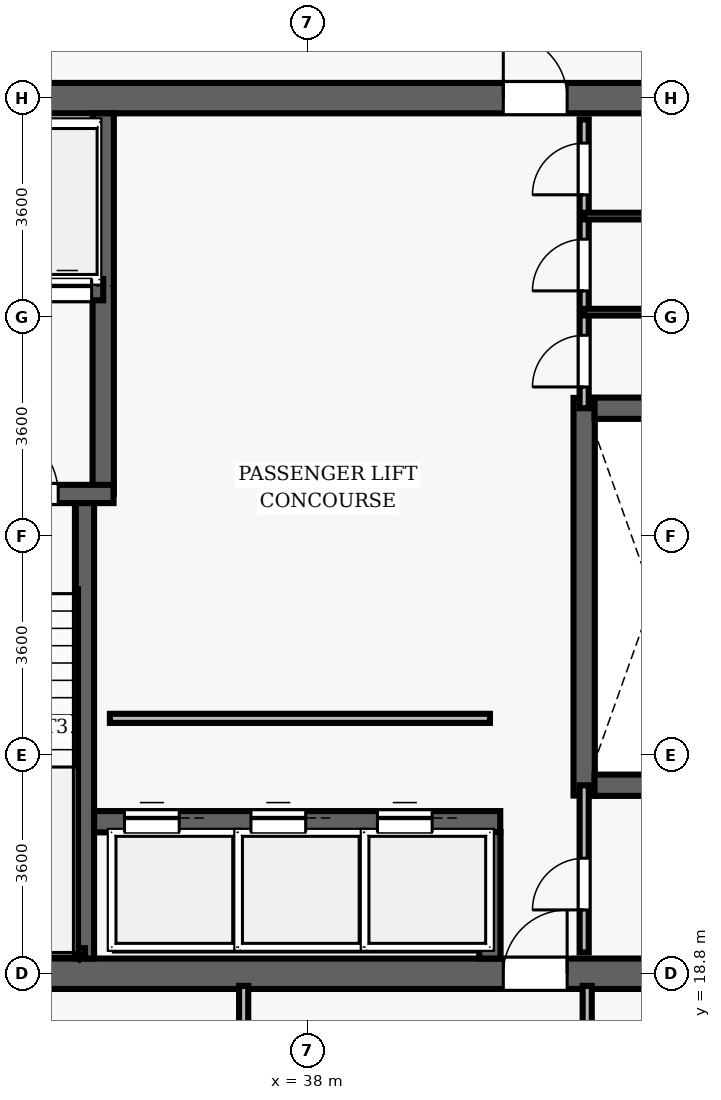
"""IFC4 building model, lengths in metres.
Left out: names, types, materials, properties, quantities, classifications, styles, units other than length and angle.
Written with IfcOpenShell. Run it as: python <this file> out.ifc"""

import sys

from ifc_helpers import new_model, si_unit, direction, frame, frame_2d, origin, place, context, subcontext, project, spatial, rectangle, extrude, element, fill, save


model = new_model("IFC4")
c1 = context("Model", 3, precision=1e-05, world=origin(), true_north=direction((0.0, 1.0)))
c2 = subcontext(c1, "Body", "Model", "MODEL_VIEW")
j1 = project(units=[si_unit("LENGTHUNIT", "METRE"), si_unit("PLANEANGLEUNIT", "RADIAN")], contexts=[c1])
p1 = place(None, origin())
s1 = spatial("IfcSite", under=j1, at=p1, CompositionType="ELEMENT")
p2 = place(p1, origin())
s2 = spatial("IfcBuilding", under=s1, at=p2, CompositionType="ELEMENT")
p3 = place(p2, frame((0.0, 0.0, 205.85)))
s3 = spatial("IfcBuildingStorey", under=s2, at=p3, CompositionType="ELEMENT", Elevation=205.85)
p4 = place(p3, frame((26.75, 18.8, 0.0), z_axis=(0.0, 0.0, 1.0), x_axis=(1.0, 0.0, 0.0)))
e1 = element("IfcWall", 1, at=p4, inside=s3, PredefinedType="SHEAR", context=c2, shape_type="SweptSolid", body=[
    extrude(rectangle(XDim=22.5, YDim=0.5, at=frame_2d((11.25, 0.0))), origin(), (0.0, 0.0, 1.0), 3.85),
])
p5 = place(p4, frame((14.47, 0.0, 0.0)))
e2 = element("IfcOpeningElement", 2, at=p5, cuts=e1, PredefinedType="OPENING", context=c2, shape_type="SweptSolid", body=[
    extrude(rectangle(XDim=1.05, YDim=2.15, at=frame_2d((0.525, 1.075))), frame((0.0, 0.26, 0.0), z_axis=(0.0, -1.0, 0.0), x_axis=(1.0, 0.0, 0.0)), (0.0, 0.0, 1.0), 0.52),
])
p6 = place(p3, frame((26.75, 33.2, 0.0), z_axis=(0.0, 0.0, 1.0), x_axis=(1.0, 0.0, 0.0)))
e3 = element("IfcWall", 3, at=p6, inside=s3, PredefinedType="SHEAR", context=c2, shape_type="SweptSolid", body=[
    extrude(rectangle(XDim=22.5, YDim=0.5, at=frame_2d((11.25, 0.0))), origin(), (0.0, 0.0, 1.0), 3.85),
])
p7 = place(p6, frame((4.57, 0.0, 0.0)))
e4 = element("IfcOpeningElement", 4, at=p7, cuts=e3, PredefinedType="OPENING", context=c2, shape_type="SweptSolid", body=[
    extrude(rectangle(XDim=1.05, YDim=2.15, at=frame_2d((0.525, 1.075))), frame((0.0, 0.26, 0.0), z_axis=(0.0, -1.0, 0.0), x_axis=(1.0, 0.0, 0.0)), (0.0, 0.0, 1.0), 0.52),
])
p8 = place(p6, frame((14.47, 0.0, 0.0)))
e5 = element("IfcOpeningElement", 5, at=p8, cuts=e3, PredefinedType="OPENING", context=c2, shape_type="SweptSolid", body=[
    extrude(rectangle(XDim=1.05, YDim=2.15, at=frame_2d((0.525, 1.075))), frame((0.0, 0.26, 0.0), z_axis=(0.0, -1.0, 0.0), x_axis=(1.0, 0.0, 0.0)), (0.0, 0.0, 1.0), 0.52),
])
p9 = place(p3, frame((34.34, 19.05, 0.0), z_axis=(0.0, 0.0, 1.0), x_axis=(0.0, 1.0, 0.0)))
e6 = element("IfcWall", 6, at=p9, inside=s3, PredefinedType="SHEAR", context=c2, shape_type="SweptSolid", body=[
    extrude(rectangle(XDim=7.5, YDim=0.3, at=frame_2d((3.75, 0.0))), origin(), (0.0, 0.0, 1.0), 3.85),
])
p10 = place(p3, frame((34.64, 26.69, 0.0), z_axis=(0.0, 0.0, 1.0), x_axis=(0.0, 1.0, 0.0)))
e7 = element("IfcWall", 7, at=p10, inside=s3, PredefinedType="SHEAR", context=c2, shape_type="SweptSolid", body=[
    extrude(rectangle(XDim=6.26, YDim=0.35, at=frame_2d((3.13, 0.0))), origin(), (0.0, 0.0, 1.0), 3.85),
])
p11 = place(p3, frame((31.25, 26.69, 0.0), z_axis=(0.0, 0.0, 1.0), x_axis=(1.0, 0.0, 0.0)))
e8 = element("IfcWall", 8, at=p11, inside=s3, PredefinedType="SHEAR", context=c2, shape_type="SweptSolid", body=[
    extrude(rectangle(XDim=3.56, YDim=0.3, at=frame_2d((1.78, 0.0))), origin(), (0.0, 0.0, 1.0), 3.85),
])
p12 = place(p11, frame((1.55, 0.0, 0.0)))
e9 = element("IfcOpeningElement", 9, at=p12, cuts=e8, PredefinedType="OPENING", context=c2, shape_type="SweptSolid", body=[
    extrude(rectangle(XDim=1.1, YDim=2.15, at=frame_2d((0.55, 1.075))), frame((0.0, 0.16, 0.0), z_axis=(0.0, -1.0, 0.0), x_axis=(1.0, 0.0, 0.0)), (0.0, 0.0, 1.0), 0.32),
])
p13 = place(p3, frame((31.3, 19.16, 0.0), z_axis=(0.0, 0.0, 1.0), x_axis=(1.0, 0.0, 0.0)))
e10 = element("IfcWall", 10, at=p13, inside=s3, PredefinedType="SHEAR", context=c2, shape_type="SweptSolid", body=[
    extrude(rectangle(XDim=3.04, YDim=0.12, at=frame_2d((1.52, 0.0))), origin(), (0.0, 0.0, 1.0), 3.85),
])
p14 = place(p3, frame((32.23, 30.05, 0.0), z_axis=(0.0, 0.0, 1.0), x_axis=(1.0, 0.0, 0.0)))
e11 = element("IfcWall", 11, at=p14, inside=s3, PredefinedType="SHEAR", context=c2, shape_type="SweptSolid", body=[
    extrude(rectangle(XDim=2.41, YDim=0.35, at=frame_2d((1.205, 0.0))), origin(), (0.0, 0.0, 1.0), 3.035),
])
p15 = place(p14, frame((0.42, 0.0, 0.0)))
e12 = element("IfcOpeningElement", 12, at=p15, cuts=e11, PredefinedType="OPENING", context=c2, shape_type="SweptSolid", body=[
    extrude(rectangle(XDim=0.8, YDim=2.15, at=frame_2d((0.4, 1.075))), frame((0.0, 0.185, 0.0), z_axis=(0.0, -1.0, 0.0), x_axis=(1.0, 0.0, 0.0)), (0.0, 0.0, 1.0), 0.37),
])
p16 = place(p14, frame((1.42, 0.0, 0.0)))
e13 = element("IfcOpeningElement", 13, at=p16, cuts=e11, PredefinedType="OPENING", context=c2, shape_type="SweptSolid", body=[
    extrude(rectangle(XDim=0.8, YDim=2.15, at=frame_2d((0.4, 1.075))), frame((0.0, 0.185, 0.0), z_axis=(0.0, -1.0, 0.0), x_axis=(1.0, 0.0, 0.0)), (0.0, 0.0, 1.0), 0.37),
])
p17 = place(p3, frame((42.55, 21.73, 0.0), z_axis=(0.0, 0.0, 1.0), x_axis=(0.0, 1.0, 0.0)))
e14 = element("IfcWall", 14, at=p17, inside=s3, PredefinedType="SHEAR", context=c2, shape_type="SweptSolid", body=[
    extrude(rectangle(XDim=6.54, YDim=0.35, at=frame_2d((3.27, 0.0))), origin(), (0.0, 0.0, 1.0), 3.035),
])
for number, where, z_axis, x_axis in (
    (15, (42.72, 21.9, 0.0), (0.0, 0.0, 1.0), (1.0, 0.0, 0.0)),
    (16, (42.72, 28.1, 0.0), (0.0, 0.0, 1.0), (1.0, 0.0, 0.0)),
):
    element("IfcWall", number, at=place(p3, frame(where, z_axis=z_axis, x_axis=x_axis)), inside=s3, PredefinedType="SHEAR", context=c2, shape_type="SweptSolid", body=[
        extrude(rectangle(XDim=2.03, YDim=0.35, at=frame_2d((1.015, 0.0))), origin(), (0.0, 0.0, 1.0), 3.035),
    ])
p18 = place(p3, frame((34.49, 21.3, 0.0), z_axis=(0.0, 0.0, 1.0), x_axis=(1.0, 0.0, 0.0)))
e17 = element("IfcWall", 17, at=p18, inside=s3, PredefinedType="SHEAR", context=c2, shape_type="SweptSolid", body=[
    extrude(rectangle(XDim=6.68, YDim=0.35, at=frame_2d((3.34, 0.0))), origin(), (0.0, 0.0, 1.0), 3.035),
])
p19 = place(p18, frame((0.5, 0.0, 0.0)))
e18 = element("IfcOpeningElement", 18, at=p19, cuts=e17, PredefinedType="OPENING", context=c2, shape_type="SweptSolid", body=[
    extrude(rectangle(XDim=0.9, YDim=2.15, at=frame_2d((0.45, 1.075))), frame((0.0, 0.185, 0.0), z_axis=(0.0, -1.0, 0.0), x_axis=(1.0, 0.0, 0.0)), (0.0, 0.0, 1.0), 0.37),
])
p20 = place(p18, frame((2.58, 0.0, 0.0)))
e19 = element("IfcOpeningElement", 19, at=p20, cuts=e17, PredefinedType="OPENING", context=c2, shape_type="SweptSolid", body=[
    extrude(rectangle(XDim=0.9, YDim=2.15, at=frame_2d((0.45, 1.075))), frame((0.0, 0.185, 0.0), z_axis=(0.0, -1.0, 0.0), x_axis=(1.0, 0.0, 0.0)), (0.0, 0.0, 1.0), 0.37),
])
p21 = place(p18, frame((4.66, 0.0, 0.0)))
e20 = element("IfcOpeningElement", 20, at=p21, cuts=e17, PredefinedType="OPENING", context=c2, shape_type="SweptSolid", body=[
    extrude(rectangle(XDim=0.9, YDim=2.15, at=frame_2d((0.45, 1.075))), frame((0.0, 0.185, 0.0), z_axis=(0.0, -1.0, 0.0), x_axis=(1.0, 0.0, 0.0)), (0.0, 0.0, 1.0), 0.37),
])
p22 = place(p3, frame((41.0, 19.05, 0.0), z_axis=(0.0, 0.0, 1.0), x_axis=(0.0, 1.0, 0.0)))
e21 = element("IfcWall", 21, at=p22, inside=s3, PredefinedType="SHEAR", context=c2, shape_type="SweptSolid", body=[
    extrude(rectangle(XDim=2.08, YDim=0.35, at=frame_2d((1.04, 0.0))), origin(), (0.0, 0.0, 1.0), 3.035),
])
p23 = place(p3, frame((34.75, 23.0, 0.0), z_axis=(0.0, 0.0, 1.0), x_axis=(1.0, 0.0, 0.0)))
e22 = element("IfcWall", 22, at=p23, inside=s3, PredefinedType="PARTITIONING", context=c2, shape_type="SweptSolid", body=[
    extrude(rectangle(XDim=6.25, YDim=0.15, at=frame_2d((3.125, 0.0))), origin(), (0.0, 0.0, 1.0), 3.035),
])
p24 = place(p3, frame((42.55, 28.1, 0.0), z_axis=(0.0, 0.0, 1.0), x_axis=(0.0, 1.0, 0.0)))
e23 = element("IfcWall", 23, at=p24, inside=s3, PredefinedType="PARTITIONING", context=c2, shape_type="SweptSolid", body=[
    extrude(rectangle(XDim=4.75, YDim=0.15, at=frame_2d((2.375, 0.0))), origin(), (0.0, 0.0, 1.0), 3.035),
])
p25 = place(p24, frame((0.35, 0.0, 0.0)))
e24 = element("IfcOpeningElement", 24, at=p25, cuts=e23, PredefinedType="OPENING", context=c2, shape_type="SweptSolid", body=[
    extrude(rectangle(XDim=0.85, YDim=2.1, at=frame_2d((0.425, 1.05))), frame((0.0, 0.085, 0.0), z_axis=(0.0, -1.0, 0.0), x_axis=(1.0, 0.0, 0.0)), (0.0, 0.0, 1.0), 0.17),
])
p26 = place(p24, frame((1.93, 0.0, 0.0)))
e25 = element("IfcOpeningElement", 25, at=p26, cuts=e23, PredefinedType="OPENING", context=c2, shape_type="SweptSolid", body=[
    extrude(rectangle(XDim=0.85, YDim=2.1, at=frame_2d((0.425, 1.05))), frame((0.0, 0.085, 0.0), z_axis=(0.0, -1.0, 0.0), x_axis=(1.0, 0.0, 0.0)), (0.0, 0.0, 1.0), 0.17),
])
p27 = place(p24, frame((3.51, 0.0, 0.0)))
e26 = element("IfcOpeningElement", 26, at=p27, cuts=e23, PredefinedType="OPENING", context=c2, shape_type="SweptSolid", body=[
    extrude(rectangle(XDim=0.85, YDim=2.1, at=frame_2d((0.425, 1.05))), frame((0.0, 0.085, 0.0), z_axis=(0.0, -1.0, 0.0), x_axis=(1.0, 0.0, 0.0)), (0.0, 0.0, 1.0), 0.17),
])
for number, where, z_axis, x_axis in (
    (27, (42.55, 29.68, 0.0), (0.0, 0.0, 1.0), (1.0, 0.0, 0.0)),
    (28, (42.55, 31.26, 0.0), (0.0, 0.0, 1.0), (1.0, 0.0, 0.0)),
):
    element("IfcWall", number, at=place(p3, frame(where, z_axis=z_axis, x_axis=x_axis)), inside=s3, PredefinedType="PARTITIONING", context=c2, shape_type="SweptSolid", body=[
        extrude(rectangle(XDim=2.2, YDim=0.11, at=frame_2d((1.1, 0.0))), origin(), (0.0, 0.0, 1.0), 3.035),
    ])
p28 = place(p3, frame((42.55, 19.15, 0.0), z_axis=(0.0, 0.0, 1.0), x_axis=(0.0, 1.0, 0.0)))
e29 = element("IfcWall", 29, at=p28, inside=s3, PredefinedType="PARTITIONING", context=c2, shape_type="SweptSolid", body=[
    extrude(rectangle(XDim=2.75, YDim=0.15, at=frame_2d((1.375, 0.0))), origin(), (0.0, 0.0, 1.0), 3.035),
])
p29 = place(p28, frame((0.7, 0.0, 0.0)))
e30 = element("IfcOpeningElement", 30, at=p29, cuts=e29, PredefinedType="OPENING", context=c2, shape_type="SweptSolid", body=[
    extrude(rectangle(XDim=0.85, YDim=2.1, at=frame_2d((0.425, 1.05))), frame((0.0, 0.085, 0.0), z_axis=(0.0, -1.0, 0.0), x_axis=(1.0, 0.0, 0.0)), (0.0, 0.0, 1.0), 0.17),
])
p30 = place(p3, frame((36.95, 11.2, 0.0), z_axis=(0.0, 0.0, 1.0), x_axis=(0.0, 1.0, 0.0)))
e31 = element("IfcWall", 31, at=p30, inside=s3, PredefinedType="PARTITIONING", context=c2, shape_type="SweptSolid", body=[
    extrude(rectangle(XDim=7.4, YDim=0.15, at=frame_2d((3.7, 0.0))), origin(), (0.0, 0.0, 1.0), 3.035),
])
p31 = place(p30, frame((5.075, 0.0, 0.0)))
e32 = element("IfcOpeningElement", 32, at=p31, cuts=e31, PredefinedType="OPENING", context=c2, shape_type="SweptSolid", body=[
    extrude(rectangle(XDim=0.95, YDim=2.15, at=frame_2d((0.475, 1.075))), frame((0.0, 0.085, 0.0), z_axis=(0.0, -1.0, 0.0), x_axis=(1.0, 0.0, 0.0)), (0.0, 0.0, 1.0), 0.17),
])
p32 = place(p3, frame((42.6, 16.65, 0.0), z_axis=(0.0, 0.0, 1.0), x_axis=(0.0, 1.0, 0.0)))
e33 = element("IfcWall", 33, at=p32, inside=s3, PredefinedType="PARTITIONING", context=c2, shape_type="SweptSolid", body=[
    extrude(rectangle(XDim=1.95, YDim=0.15, at=frame_2d((0.975, 0.0))), origin(), (0.0, 0.0, 1.0), 3.035),
])
p33 = place(p12, origin())
e34 = element("IfcDoor", 34, at=p33, inside=s3, OperationType="SINGLE_SWING_LEFT", PredefinedType="DOOR", context=c2, shape_type="SweptSolid", body=[
    extrude(rectangle(XDim=1.1, YDim=2.15, at=frame_2d((0.55, 1.075))), frame((0.0, 0.025, 0.0), z_axis=(0.0, -1.0, 0.0), x_axis=(1.0, 0.0, 0.0)), (0.0, 0.0, 1.0), 0.05),
])
fill(e9, e34)
p34 = place(p8, origin())
e35 = element("IfcDoor", 35, at=p34, inside=s3, OperationType="SINGLE_SWING_LEFT", PredefinedType="DOOR", context=c2, shape_type="SweptSolid", body=[
    extrude(rectangle(XDim=1.05, YDim=2.15, at=frame_2d((0.525, 1.075))), frame((0.0, 0.025, 0.0), z_axis=(0.0, -1.0, 0.0), x_axis=(1.0, 0.0, 0.0)), (0.0, 0.0, 1.0), 0.05),
])
fill(e5, e35)
p35 = place(p5, origin())
e36 = element("IfcDoor", 36, at=p35, inside=s3, OperationType="SINGLE_SWING_RIGHT", PredefinedType="DOOR", context=c2, shape_type="SweptSolid", body=[
    extrude(rectangle(XDim=1.05, YDim=2.15, at=frame_2d((0.525, 1.075))), frame((0.0, 0.025, 0.0), z_axis=(0.0, -1.0, 0.0), x_axis=(1.0, 0.0, 0.0)), (0.0, 0.0, 1.0), 0.05),
])
fill(e2, e36)
p36 = place(p25, origin())
e37 = element("IfcDoor", 37, at=p36, inside=s3, OperationType="SINGLE_SWING_LEFT", PredefinedType="DOOR", context=c2, shape_type="SweptSolid", body=[
    extrude(rectangle(XDim=0.85, YDim=2.1, at=frame_2d((0.425, 1.05))), frame((0.0, 0.025, 0.0), z_axis=(0.0, -1.0, 0.0), x_axis=(1.0, 0.0, 0.0)), (0.0, 0.0, 1.0), 0.05),
])
fill(e24, e37)
p37 = place(p26, origin())
e38 = element("IfcDoor", 38, at=p37, inside=s3, OperationType="SINGLE_SWING_LEFT", PredefinedType="DOOR", context=c2, shape_type="SweptSolid", body=[
    extrude(rectangle(XDim=0.85, YDim=2.1, at=frame_2d((0.425, 1.05))), frame((0.0, 0.025, 0.0), z_axis=(0.0, -1.0, 0.0), x_axis=(1.0, 0.0, 0.0)), (0.0, 0.0, 1.0), 0.05),
])
fill(e25, e38)
p38 = place(p27, origin())
e39 = element("IfcDoor", 39, at=p38, inside=s3, OperationType="SINGLE_SWING_LEFT", PredefinedType="DOOR", context=c2, shape_type="SweptSolid", body=[
    extrude(rectangle(XDim=0.85, YDim=2.1, at=frame_2d((0.425, 1.05))), frame((0.0, 0.025, 0.0), z_axis=(0.0, -1.0, 0.0), x_axis=(1.0, 0.0, 0.0)), (0.0, 0.0, 1.0), 0.05),
])
fill(e26, e39)
p39 = place(p29, origin())
e40 = element("IfcDoor", 40, at=p39, inside=s3, OperationType="SINGLE_SWING_LEFT", PredefinedType="DOOR", context=c2, shape_type="SweptSolid", body=[
    extrude(rectangle(XDim=0.85, YDim=2.1, at=frame_2d((0.425, 1.05))), frame((0.0, 0.025, 0.0), z_axis=(0.0, -1.0, 0.0), x_axis=(1.0, 0.0, 0.0)), (0.0, 0.0, 1.0), 0.05),
])
fill(e30, e40)
p40 = place(p19, origin())
e41 = element("IfcDoor", 41, at=p40, inside=s3, OperationType="SLIDING_TO_LEFT", PredefinedType="DOOR", context=c2, shape_type="SweptSolid", body=[
    extrude(rectangle(XDim=0.9, YDim=2.15, at=frame_2d((0.45, 1.075))), frame((0.0, 0.025, 0.0), z_axis=(0.0, -1.0, 0.0), x_axis=(1.0, 0.0, 0.0)), (0.0, 0.0, 1.0), 0.05),
])
fill(e18, e41)
p41 = place(p20, origin())
e42 = element("IfcDoor", 42, at=p41, inside=s3, OperationType="SLIDING_TO_LEFT", PredefinedType="DOOR", context=c2, shape_type="SweptSolid", body=[
    extrude(rectangle(XDim=0.9, YDim=2.15, at=frame_2d((0.45, 1.075))), frame((0.0, 0.025, 0.0), z_axis=(0.0, -1.0, 0.0), x_axis=(1.0, 0.0, 0.0)), (0.0, 0.0, 1.0), 0.05),
])
fill(e19, e42)
p42 = place(p21, origin())
e43 = element("IfcDoor", 43, at=p42, inside=s3, OperationType="SLIDING_TO_LEFT", PredefinedType="DOOR", context=c2, shape_type="SweptSolid", body=[
    extrude(rectangle(XDim=0.9, YDim=2.15, at=frame_2d((0.45, 1.075))), frame((0.0, 0.025, 0.0), z_axis=(0.0, -1.0, 0.0), x_axis=(1.0, 0.0, 0.0)), (0.0, 0.0, 1.0), 0.05),
])
fill(e20, e43)
p43 = place(p16, origin())
e44 = element("IfcDoor", 44, at=p43, inside=s3, OperationType="SLIDING_TO_LEFT", PredefinedType="DOOR", context=c2, shape_type="SweptSolid", body=[
    extrude(rectangle(XDim=0.8, YDim=2.15, at=frame_2d((0.4, 1.075))), frame((0.0, 0.025, 0.0), z_axis=(0.0, -1.0, 0.0), x_axis=(1.0, 0.0, 0.0)), (0.0, 0.0, 1.0), 0.05),
])
fill(e13, e44)
save(model, sys.argv[1])
